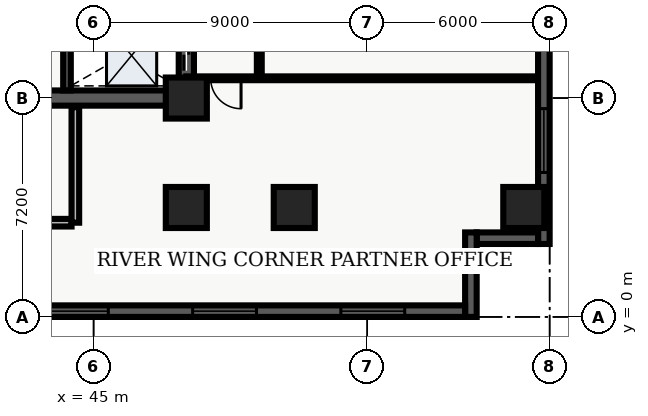
"""IFC4 building model, lengths in metres.
Left out: names, types, materials, properties, quantities, classifications, styles, units other than length and angle.
Written with IfcOpenShell. Run it as: python <this file> out.ifc"""

import sys

from ifc_helpers import new_model, entity, si_unit, converted_unit, direction, frame, origin_with_axes, origin_2d_with_axis, place, context, subcontext, project, spatial, polyline, rectangle, outline, extrude, element, fill, save


model = new_model("IFC4")
c1 = context("Model", 3, precision=1e-05, world=origin_with_axes(), true_north=direction((0.0, 1.0)))
c2 = subcontext(c1, "Body", "Model", "MODEL_VIEW")
j1 = project(units=[si_unit("LENGTHUNIT", "METRE"), converted_unit("PLANEANGLEUNIT", "DEGREE", entity("IfcPlaneAngleMeasure", 0.017), si_unit("PLANEANGLEUNIT", "RADIAN"), dimensions=[0, 0, 0, 0, 0, 0, 0])], contexts=[c1])
p1 = place(None, origin_with_axes())
s1 = spatial("IfcSite", under=j1, at=p1, CompositionType="ELEMENT")
p2 = place(p1, origin_with_axes())
s2 = spatial("IfcBuilding", under=s1, at=p2, CompositionType="ELEMENT")
p3 = place(p2, frame((0.0, 0.0, 84.6), z_axis=(0.0, 0.0, 1.0), x_axis=(1.0, 0.0, 0.0)))
s3 = spatial("IfcBuildingStorey", under=s2, at=p3, CompositionType="ELEMENT", Elevation=84.6)
p4 = place(p3, frame((40.2, 7.2, 0.0), z_axis=(0.0, 0.0, 1.0), x_axis=(1.0, 0.0, 0.0)))
e1 = element("IfcWall", 1, at=p4, inside=s3, PredefinedType="SHEAR", context=c2, shape_type="SweptSolid", body=[
    extrude(outline(polyline([(0.0, -0.25), (7.85, -0.25), (7.85, 0.25), (0.0, 0.25), (0.0, -0.25)])), origin_with_axes(), (0.0, 0.0, 1.0), 4.26),
])
p5 = place(p4, frame((2.175, 0.0, 0.0), z_axis=(0.0, 0.0, 1.0), x_axis=(1.0, 0.0, 0.0)))
e2 = element("IfcOpeningElement", 2, at=p5, cuts=e1, PredefinedType="OPENING", context=c2, shape_type="SweptSolid", body=[
    extrude(rectangle(XDim=1.05, YDim=0.52, at=origin_2d_with_axis()), origin_with_axes(), (0.0, 0.0, 1.0), 2.15),
])
p6 = place(p3, frame((48.05, 7.2, 0.0), z_axis=(0.0, 0.0, 1.0), x_axis=(0.0, 1.0, 0.0)))
e3 = element("IfcWall", 3, at=p6, inside=s3, PredefinedType="SHEAR", context=c2, shape_type="SweptSolid", body=[
    extrude(outline(polyline([(0.0, -0.25), (15.6, -0.25), (15.6, 0.25), (0.0, 0.25), (0.0, -0.25)])), origin_with_axes(), (0.0, 0.0, 1.0), 4.26),
])
p7 = place(p6, frame((1.425, 0.0, 0.0), z_axis=(0.0, 0.0, 1.0), x_axis=(1.0, 0.0, 0.0)))
e4 = element("IfcOpeningElement", 4, at=p7, cuts=e3, PredefinedType="OPENING", context=c2, shape_type="SweptSolid", body=[
    extrude(rectangle(XDim=1.05, YDim=0.52, at=origin_2d_with_axis()), origin_with_axes(), (0.0, 0.0, 1.0), 2.15),
])
p8 = place(p6, frame((3.475, 0.0, 0.0), z_axis=(0.0, 0.0, 1.0), x_axis=(1.0, 0.0, 0.0)))
e5 = element("IfcOpeningElement", 5, at=p8, cuts=e3, PredefinedType="OPENING", context=c2, shape_type="SweptSolid", body=[
    extrude(rectangle(XDim=1.05, YDim=0.52, at=origin_2d_with_axis()), origin_with_axes(), (0.0, 0.0, 1.0), 2.15),
])
p9 = place(p6, frame((5.625, 0.0, 0.0), z_axis=(0.0, 0.0, 1.0), x_axis=(1.0, 0.0, 0.0)))
e6 = element("IfcOpeningElement", 6, at=p9, cuts=e3, PredefinedType="OPENING", context=c2, shape_type="SweptSolid", body=[
    extrude(rectangle(XDim=0.95, YDim=0.52, at=origin_2d_with_axis()), origin_with_axes(), (0.0, 0.0, 1.0), 2.15),
])
p10 = place(p3, frame((44.125, 7.45, 0.0), z_axis=(0.0, 0.0, 1.0), x_axis=(0.0, 1.0, 0.0)))
e7 = element("IfcWall", 7, at=p10, inside=s3, PredefinedType="SHEAR", context=c2, shape_type="SweptSolid", body=[
    extrude(outline(polyline([(0.0, -0.125), (15.1, -0.125), (15.1, 0.125), (0.0, 0.125), (0.0, -0.125)])), origin_with_axes(), (0.0, 0.0, 1.0), 4.26),
])
p11 = place(p3, frame((40.325, 3.1, 0.0), z_axis=(0.0, 0.0, 1.0), x_axis=(1.0, 0.0, 0.0)))
e8 = element("IfcWall", 8, at=p11, inside=s3, PredefinedType="SOLIDWALL", context=c2, shape_type="SweptSolid", body=[
    extrude(outline(polyline([(0.0, -0.125), (3.95, -0.125), (3.95, 0.125), (0.0, 0.125), (0.0, -0.125)])), origin_with_axes(), (0.0, 0.0, 1.0), 3.3),
])
p12 = place(p3, frame((44.4, 3.1, 0.0), z_axis=(0.0, 0.0, 1.0), x_axis=(0.0, 1.0, 0.0)))
e9 = element("IfcWall", 9, at=p12, inside=s3, PredefinedType="SOLIDWALL", context=c2, shape_type="SweptSolid", body=[
    extrude(outline(polyline([(0.0, -0.125), (3.8, -0.125), (3.8, 0.125), (0.0, 0.125), (0.0, -0.125)])), origin_with_axes(), (0.0, 0.0, 1.0), 3.3),
])
for number, where, z_axis, x_axis in (
    (10, (48.05, 3.6, 0.0), (0.0, 0.0, 1.0), (1.0, 0.0, 0.0)),
    (11, (48.05, 7.2, 0.0), (0.0, 0.0, 1.0), (1.0, 0.0, 0.0)),
    (12, (51.6, 3.6, 0.0), (0.0, 0.0, 1.0), (1.0, 0.0, 0.0)),
    (13, (59.15, 3.6, 0.0), (0.0, 0.0, 1.0), (1.0, 0.0, 0.0)),
):
    element("IfcColumn", number, at=place(p3, frame(where, z_axis=z_axis, x_axis=x_axis)), inside=s3, PredefinedType="COLUMN", context=c2, shape_type="SweptSolid", body=[
        extrude(rectangle(XDim=1.35, YDim=1.35, at=origin_2d_with_axis()), origin_with_axes(), (0.0, 0.0, 1.0), 4.5),
    ])
p13 = place(p3, frame((50.45, 7.85, 0.0), z_axis=(0.0, 0.0, 1.0), x_axis=(0.0, 1.0, 0.0)))
e14 = element("IfcWall", 14, at=p13, inside=s3, PredefinedType="PARTITIONING", context=c2, shape_type="SweptSolid", body=[
    extrude(outline(polyline([(0.0, -0.08), (18.8, -0.08), (18.8, 0.08), (0.0, 0.08), (0.0, -0.08)])), origin_with_axes(), (0.0, 0.0, 1.0), 3.2),
])
p14 = place(p13, frame((4.293, 0.0, 0.0), z_axis=(0.0, 0.0, 1.0), x_axis=(1.0, 0.0, 0.0)))
e15 = element("IfcOpeningElement", 15, at=p14, cuts=e14, PredefinedType="OPENING", context=c2, shape_type="SweptSolid", body=[
    extrude(rectangle(XDim=1.0, YDim=0.18, at=origin_2d_with_axis()), origin_with_axes(), (0.0, 0.0, 1.0), 2.15),
])
p15 = place(p13, frame((13.633, 0.0, 0.0), z_axis=(0.0, 0.0, 1.0), x_axis=(1.0, 0.0, 0.0)))
e16 = element("IfcOpeningElement", 16, at=p15, cuts=e14, PredefinedType="OPENING", context=c2, shape_type="SweptSolid", body=[
    extrude(rectangle(XDim=1.0, YDim=0.18, at=origin_2d_with_axis()), origin_with_axes(), (0.0, 0.0, 1.0), 2.15),
])
p16 = place(p3, frame((59.64, 7.85, 0.0), z_axis=(0.0, 0.0, 1.0), x_axis=(-1.0, 0.0, 0.0)))
e17 = element("IfcWall", 17, at=p16, inside=s3, PredefinedType="PARTITIONING", context=c2, shape_type="SweptSolid", body=[
    extrude(outline(polyline([(0.0, -0.062), (11.59, -0.062), (11.59, 0.062), (0.0, 0.062), (0.0, -0.062)])), origin_with_axes(), (0.0, 0.0, 1.0), 3.2),
])
p17 = place(p16, frame((10.29, 0.0, 0.0), z_axis=(0.0, 0.0, 1.0), x_axis=(1.0, 0.0, 0.0)))
e18 = element("IfcOpeningElement", 18, at=p17, cuts=e17, PredefinedType="OPENING", context=c2, shape_type="SweptSolid", body=[
    extrude(rectangle(XDim=1.0, YDim=0.145, at=origin_2d_with_axis()), origin_with_axes(), (0.0, 0.0, 1.0), 2.15),
])
p18 = place(p3, frame((59.81, 26.02, 0.0), z_axis=(0.0, 0.0, 1.0), x_axis=(0.0, -1.0, 0.0)))
e19 = element("IfcWall", 19, at=p18, inside=s3, PredefinedType="SOLIDWALL", context=c2, shape_type="SweptSolid", body=[
    extrude(outline(polyline([(0.0, -0.19), (23.62, -0.19), (23.62, 0.19), (0.0, 0.19), (0.0, -0.19)])), origin_with_axes(), (0.0, 0.0, 1.0), 4.26),
])
p19 = place(p18, frame((3.853, 0.0, 0.45), z_axis=(0.0, 0.0, 1.0), x_axis=(1.0, 0.0, 0.0)))
e20 = element("IfcOpeningElement", 20, at=p19, cuts=e19, PredefinedType="OPENING", context=c2, shape_type="SweptSolid", body=[
    extrude(rectangle(XDim=2.1, YDim=0.4, at=origin_2d_with_axis()), origin_with_axes(), (0.0, 0.0, 1.0), 2.2),
])
p20 = place(p18, frame((20.218, 0.0, 0.45), z_axis=(0.0, 0.0, 1.0), x_axis=(1.0, 0.0, 0.0)))
e21 = element("IfcOpeningElement", 21, at=p20, cuts=e19, PredefinedType="OPENING", context=c2, shape_type="SweptSolid", body=[
    extrude(rectangle(XDim=2.1, YDim=0.4, at=origin_2d_with_axis()), origin_with_axes(), (0.0, 0.0, 1.0), 2.2),
])
p21 = place(p3, frame((59.62, 2.59, 0.0), z_axis=(0.0, 0.0, 1.0), x_axis=(-1.0, 0.0, 0.0)))
e22 = element("IfcWall", 22, at=p21, inside=s3, PredefinedType="SOLIDWALL", context=c2, shape_type="SweptSolid", body=[
    extrude(outline(polyline([(0.0, -0.19), (2.02, -0.19), (2.02, 0.19), (0.0, 0.19), (0.0, -0.19)])), origin_with_axes(), (0.0, 0.0, 1.0), 4.26),
])
p22 = place(p3, frame((57.41, 2.78, 0.0), z_axis=(0.0, 0.0, 1.0), x_axis=(0.0, -1.0, 0.0)))
e23 = element("IfcWall", 23, at=p22, inside=s3, PredefinedType="SOLIDWALL", context=c2, shape_type="SweptSolid", body=[
    extrude(outline(polyline([(0.0, -0.19), (2.78, -0.19), (2.78, 0.19), (0.0, 0.19), (0.0, -0.19)])), origin_with_axes(), (0.0, 0.0, 1.0), 4.26),
])
p23 = place(p3, frame((57.22, 0.19, 0.0), z_axis=(0.0, 0.0, 1.0), x_axis=(-1.0, 0.0, 0.0)))
e24 = element("IfcWall", 24, at=p23, inside=s3, PredefinedType="SOLIDWALL", context=c2, shape_type="SweptSolid", body=[
    extrude(outline(polyline([(0.0, -0.19), (54.82, -0.19), (54.82, 0.19), (0.0, 0.19), (0.0, -0.19)])), origin_with_axes(), (0.0, 0.0, 1.0), 4.26),
])
p24 = place(p23, frame((3.037, 0.0, 0.45), z_axis=(0.0, 0.0, 1.0), x_axis=(1.0, 0.0, 0.0)))
e25 = element("IfcOpeningElement", 25, at=p24, cuts=e24, PredefinedType="OPENING", context=c2, shape_type="SweptSolid", body=[
    extrude(rectangle(XDim=2.1, YDim=0.4, at=origin_2d_with_axis()), origin_with_axes(), (0.0, 0.0, 1.0), 2.2),
])
p25 = place(p23, frame((7.912, 0.0, 0.45), z_axis=(0.0, 0.0, 1.0), x_axis=(1.0, 0.0, 0.0)))
e26 = element("IfcOpeningElement", 26, at=p25, cuts=e24, PredefinedType="OPENING", context=c2, shape_type="SweptSolid", body=[
    extrude(rectangle(XDim=2.1, YDim=0.4, at=origin_2d_with_axis()), origin_with_axes(), (0.0, 0.0, 1.0), 2.2),
])
p26 = place(p23, frame((12.786, 0.0, 0.45), z_axis=(0.0, 0.0, 1.0), x_axis=(1.0, 0.0, 0.0)))
e27 = element("IfcOpeningElement", 27, at=p26, cuts=e24, PredefinedType="OPENING", context=c2, shape_type="SweptSolid", body=[
    extrude(rectangle(XDim=2.1, YDim=0.4, at=origin_2d_with_axis()), origin_with_axes(), (0.0, 0.0, 1.0), 2.2),
])
p27 = place(p23, frame((17.661, 0.0, 0.45), z_axis=(0.0, 0.0, 1.0), x_axis=(1.0, 0.0, 0.0)))
e28 = element("IfcOpeningElement", 28, at=p27, cuts=e24, PredefinedType="OPENING", context=c2, shape_type="SweptSolid", body=[
    extrude(rectangle(XDim=2.1, YDim=0.4, at=origin_2d_with_axis()), origin_with_axes(), (0.0, 0.0, 1.0), 2.2),
])
p28 = place(p23, frame((22.535, 0.0, 0.45), z_axis=(0.0, 0.0, 1.0), x_axis=(1.0, 0.0, 0.0)))
e29 = element("IfcOpeningElement", 29, at=p28, cuts=e24, PredefinedType="OPENING", context=c2, shape_type="SweptSolid", body=[
    extrude(rectangle(XDim=2.1, YDim=0.4, at=origin_2d_with_axis()), origin_with_axes(), (0.0, 0.0, 1.0), 2.2),
])
p29 = place(p23, frame((27.41, 0.0, 0.45), z_axis=(0.0, 0.0, 1.0), x_axis=(1.0, 0.0, 0.0)))
e30 = element("IfcOpeningElement", 30, at=p29, cuts=e24, PredefinedType="OPENING", context=c2, shape_type="SweptSolid", body=[
    extrude(rectangle(XDim=2.1, YDim=0.4, at=origin_2d_with_axis()), origin_with_axes(), (0.0, 0.0, 1.0), 2.2),
])
p30 = place(p23, frame((32.285, 0.0, 0.45), z_axis=(0.0, 0.0, 1.0), x_axis=(1.0, 0.0, 0.0)))
e31 = element("IfcOpeningElement", 31, at=p30, cuts=e24, PredefinedType="OPENING", context=c2, shape_type="SweptSolid", body=[
    extrude(rectangle(XDim=2.1, YDim=0.4, at=origin_2d_with_axis()), origin_with_axes(), (0.0, 0.0, 1.0), 2.2),
])
p31 = place(p23, frame((37.159, 0.0, 0.45), z_axis=(0.0, 0.0, 1.0), x_axis=(1.0, 0.0, 0.0)))
e32 = element("IfcOpeningElement", 32, at=p31, cuts=e24, PredefinedType="OPENING", context=c2, shape_type="SweptSolid", body=[
    extrude(rectangle(XDim=2.1, YDim=0.4, at=origin_2d_with_axis()), origin_with_axes(), (0.0, 0.0, 1.0), 2.2),
])
p32 = place(p23, frame((42.034, 0.0, 0.45), z_axis=(0.0, 0.0, 1.0), x_axis=(1.0, 0.0, 0.0)))
e33 = element("IfcOpeningElement", 33, at=p32, cuts=e24, PredefinedType="OPENING", context=c2, shape_type="SweptSolid", body=[
    extrude(rectangle(XDim=2.1, YDim=0.4, at=origin_2d_with_axis()), origin_with_axes(), (0.0, 0.0, 1.0), 2.2),
])
p33 = place(p23, frame((46.908, 0.0, 0.45), z_axis=(0.0, 0.0, 1.0), x_axis=(1.0, 0.0, 0.0)))
e34 = element("IfcOpeningElement", 34, at=p33, cuts=e24, PredefinedType="OPENING", context=c2, shape_type="SweptSolid", body=[
    extrude(rectangle(XDim=2.1, YDim=0.4, at=origin_2d_with_axis()), origin_with_axes(), (0.0, 0.0, 1.0), 2.2),
])
p34 = place(p23, frame((51.783, 0.0, 0.45), z_axis=(0.0, 0.0, 1.0), x_axis=(1.0, 0.0, 0.0)))
e35 = element("IfcOpeningElement", 35, at=p34, cuts=e24, PredefinedType="OPENING", context=c2, shape_type="SweptSolid", body=[
    extrude(rectangle(XDim=2.1, YDim=0.4, at=origin_2d_with_axis()), origin_with_axes(), (0.0, 0.0, 1.0), 2.2),
])
p35 = place(p6, frame((1.425, 0.0, 0.0), z_axis=(0.0, 0.0, 1.0), x_axis=(1.0, 0.0, 0.0)))
e36 = element("IfcDoor", 36, at=p35, inside=s3, OperationType="SLIDING_TO_LEFT", PredefinedType="DOOR", context=c2, shape_type="SweptSolid", body=[
    extrude(rectangle(XDim=1.05, YDim=0.09, at=origin_2d_with_axis()), origin_with_axes(), (0.0, 0.0, 1.0), 2.15),
])
fill(e4, e36)
p36 = place(p16, frame((10.29, 0.0, 0.0), z_axis=(0.0, 0.0, 1.0), x_axis=(1.0, 0.0, 0.0)))
e37 = element("IfcDoor", 37, at=p36, inside=s3, OperationType="SINGLE_SWING_LEFT", PredefinedType="DOOR", context=c2, shape_type="SweptSolid", body=[
    extrude(rectangle(XDim=1.0, YDim=0.075, at=origin_2d_with_axis()), origin_with_axes(), (0.0, 0.0, 1.0), 2.15),
])
fill(e18, e37)
p37 = place(p18, frame((20.218, 0.0, 0.45), z_axis=(0.0, 0.0, 1.0), x_axis=(1.0, 0.0, 0.0)))
e38 = element("IfcWindow", 38, at=p37, inside=s3, PredefinedType="WINDOW", context=c2, shape_type="SweptSolid", body=[
    extrude(rectangle(XDim=2.1, YDim=0.09, at=origin_2d_with_axis()), origin_with_axes(), (0.0, 0.0, 1.0), 2.2),
])
fill(e21, e38)
p38 = place(p23, frame((3.037, 0.0, 0.45), z_axis=(0.0, 0.0, 1.0), x_axis=(1.0, 0.0, 0.0)))
e39 = element("IfcWindow", 39, at=p38, inside=s3, PredefinedType="WINDOW", context=c2, shape_type="SweptSolid", body=[
    extrude(rectangle(XDim=2.1, YDim=0.09, at=origin_2d_with_axis()), origin_with_axes(), (0.0, 0.0, 1.0), 2.2),
])
fill(e25, e39)
p39 = place(p23, frame((7.912, 0.0, 0.45), z_axis=(0.0, 0.0, 1.0), x_axis=(1.0, 0.0, 0.0)))
e40 = element("IfcWindow", 40, at=p39, inside=s3, PredefinedType="WINDOW", context=c2, shape_type="SweptSolid", body=[
    extrude(rectangle(XDim=2.1, YDim=0.09, at=origin_2d_with_axis()), origin_with_axes(), (0.0, 0.0, 1.0), 2.2),
])
fill(e26, e40)
p40 = place(p23, frame((12.786, 0.0, 0.45), z_axis=(0.0, 0.0, 1.0), x_axis=(1.0, 0.0, 0.0)))
e41 = element("IfcWindow", 41, at=p40, inside=s3, PredefinedType="WINDOW", context=c2, shape_type="SweptSolid", body=[
    extrude(rectangle(XDim=2.1, YDim=0.09, at=origin_2d_with_axis()), origin_with_axes(), (0.0, 0.0, 1.0), 2.2),
])
fill(e27, e41)
save(model, sys.argv[1])
